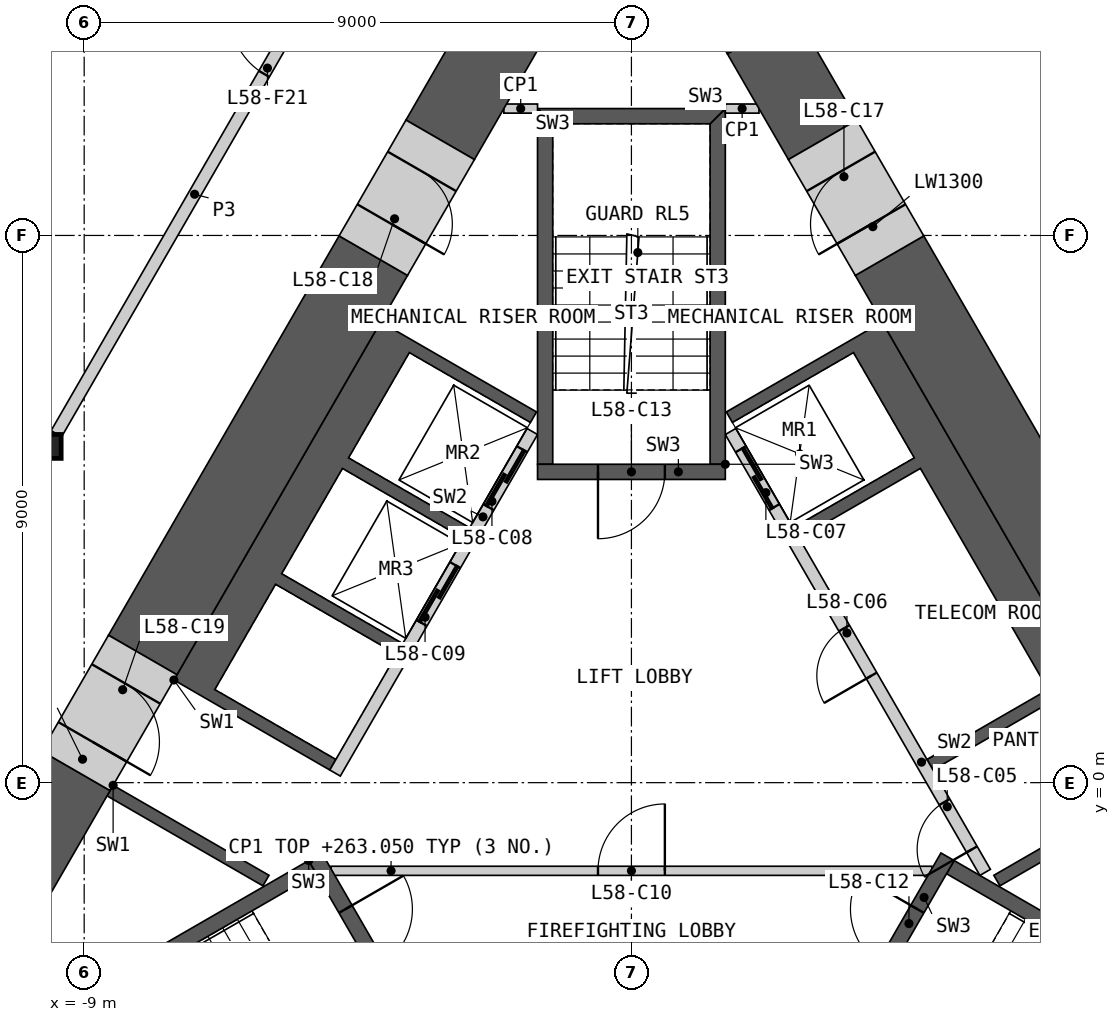
"""IFC4 building model, lengths in metres.
Left out: names, types, materials, properties, quantities, classifications, styles, units other than length and angle.
Written with IfcOpenShell. Run it as: python <this file> out.ifc"""

import sys

from ifc_helpers import new_model, si_unit, direction, frame, frame_2d, origin, origin_2d, place, context, subcontext, project, spatial, polyline, rectangle, i_section, outline, extrude, element, fill, save


model = new_model("IFC4")
c1 = context("Model", 3, precision=1e-05, world=origin(), true_north=direction((0.0, 1.0)))
c2 = subcontext(c1, "Body", "Model", "MODEL_VIEW")
j1 = project(units=[si_unit("LENGTHUNIT", "METRE"), si_unit("PLANEANGLEUNIT", "RADIAN")], contexts=[c1])
p1 = place(None, origin())
s1 = spatial("IfcSite", under=j1, at=p1, CompositionType="ELEMENT")
p2 = place(p1, origin())
s2 = spatial("IfcBuilding", under=s1, at=p2, CompositionType="ELEMENT")
p3 = place(p2, frame((0.0, 0.0, 259.8)))
s3 = spatial("IfcBuildingStorey", under=s2, at=p3, CompositionType="ELEMENT", Elevation=259.8)
p4 = place(p3, frame((-9.578, 5.53, 0.0), z_axis=(0.0, 0.0, 1.0), x_axis=(1.0, 0.0, 0.0)))
e1 = element("IfcColumn", 1, at=p4, inside=s3, PredefinedType="COLUMN", context=c2, shape_type="SweptSolid", body=[
    extrude(i_section(OverallWidth=0.399, OverallDepth=0.393, WebThickness=0.023, FlangeThickness=0.037, at=origin_2d()), origin(), (0.0, 0.0, 1.0), 3.6),
])
p5 = place(p3, origin())
e2 = element("IfcWall", 2, at=p5, inside=s3, PredefinedType="SHEAR", context=c2, shape_type="SweptSolid", body=[
    extrude(outline(polyline([(8.524, -0.044), (8.624, -0.217), (8.231, -0.444), (6.061, -1.697), (5.96, -1.524), (8.131, -0.271), (8.524, -0.044)])), origin(), (0.0, 0.0, 1.0), 3.25),
])
p6 = place(p3, origin())
e3 = element("IfcWall", 3, at=p6, inside=s3, PredefinedType="SHEAR", context=c2, shape_type="SweptSolid", body=[
    extrude(outline(polyline([(7.524, 1.688), (7.131, 1.461), (4.96, 0.208), (4.861, 0.381), (6.852, 1.531), (4.752, 5.169), (2.76, 4.019), (2.66, 4.192), (4.652, 5.342), (3.652, 7.074), (1.66, 5.924), (1.561, 6.097), (3.731, 7.35), (4.124, 7.577), (7.524, 1.688)])), origin(), (0.0, 0.0, 1.0), 3.25),
])
p7 = place(p3, frame((5.817, -1.476, 0.0), z_axis=(0.0, 0.0, 1.0), x_axis=(-0.500002616675, 0.866023893041, 0.0)))
e4 = element("IfcWall", 4, at=p7, inside=s3, PredefinedType="SOLIDWALL", context=c2, shape_type="SweptSolid", body=[
    extrude(rectangle(XDim=8.373, YDim=0.2, at=frame_2d((4.187, 0.0))), origin(), (0.0, 0.0, 1.0), 3.25),
])
p8 = place(p7, frame((0.437, 0.0, 0.0)))
e5 = element("IfcOpeningElement", 5, at=p8, cuts=e4, PredefinedType="OPENING", context=c2, shape_type="SweptSolid", body=[
    extrude(rectangle(XDim=0.9, YDim=2.1, at=frame_2d((0.45, 1.05))), frame((0.0, 0.11, 0.0), z_axis=(0.0, -1.0, 0.0), x_axis=(1.0, 0.0, 0.0)), (0.0, 0.0, 1.0), 0.22),
])
p9 = place(p7, frame((3.737, 0.0, 0.0)))
e6 = element("IfcOpeningElement", 6, at=p9, cuts=e4, PredefinedType="OPENING", context=c2, shape_type="SweptSolid", body=[
    extrude(rectangle(XDim=0.9, YDim=2.1, at=frame_2d((0.45, 1.05))), frame((0.0, 0.11, 0.0), z_axis=(0.0, -1.0, 0.0), x_axis=(1.0, 0.0, 0.0)), (0.0, 0.0, 1.0), 0.22),
])
p10 = place(p7, frame((6.937, 0.0, 0.0)))
e7 = element("IfcOpeningElement", 7, at=p10, cuts=e4, PredefinedType="OPENING", context=c2, shape_type="SweptSolid", body=[
    extrude(rectangle(XDim=1.1, YDim=2.1, at=frame_2d((0.55, 1.05))), frame((0.0, 0.11, 0.0), z_axis=(0.0, -1.0, 0.0), x_axis=(1.0, 0.0, 0.0)), (0.0, 0.0, 1.0), 0.22),
])
p11 = place(p3, origin())
e8 = element("IfcWall", 8, at=p11, inside=s3, PredefinedType="SHEAR", context=c2, shape_type="SweptSolid", body=[
    extrude(outline(polyline([(-7.524, 1.688), (-4.124, 7.577), (-3.731, 7.35), (-1.561, 6.097), (-1.66, 5.924), (-3.652, 7.074), (-4.652, 5.342), (-2.66, 4.192), (-2.76, 4.019), (-4.752, 5.169), (-5.752, 3.437), (-3.76, 2.287), (-3.861, 2.113), (-5.852, 3.263), (-6.852, 1.531), (-4.861, 0.381), (-4.96, 0.208), (-7.131, 1.461), (-7.524, 1.688)])), origin(), (0.0, 0.0, 1.0), 3.25),
])
p12 = place(p3, origin())
e9 = element("IfcWall", 9, at=p12, inside=s3, PredefinedType="SHEAR", context=c2, shape_type="SweptSolid", body=[
    extrude(outline(polyline([(-8.524, -0.044), (-8.131, -0.271), (-5.96, -1.524), (-6.061, -1.697), (-8.231, -0.444), (-8.624, -0.217), (-8.524, -0.044)])), origin(), (0.0, 0.0, 1.0), 3.25),
])
p13 = place(p3, frame((-1.631, 5.776, 0.0), z_axis=(0.0, 0.0, 1.0), x_axis=(-0.499992876559, -0.866029516466, 0.0)))
e10 = element("IfcWall", 10, at=p13, inside=s3, PredefinedType="SOLIDWALL", context=c2, shape_type="SweptSolid", body=[
    extrude(rectangle(XDim=6.486, YDim=0.2, at=frame_2d((3.243, 0.0))), origin(), (0.0, 0.0, 1.0), 3.25),
])
p14 = place(p13, frame((0.337, 0.0, 0.0)))
e11 = element("IfcOpeningElement", 11, at=p14, cuts=e10, PredefinedType="OPENING", context=c2, shape_type="SweptSolid", body=[
    extrude(rectangle(XDim=1.1, YDim=2.1, at=frame_2d((0.55, 1.05))), frame((0.0, 0.11, 0.0), z_axis=(0.0, -1.0, 0.0), x_axis=(1.0, 0.0, 0.0)), (0.0, 0.0, 1.0), 0.22),
])
p15 = place(p13, frame((2.537, 0.0, 0.0)))
e12 = element("IfcOpeningElement", 12, at=p15, cuts=e10, PredefinedType="OPENING", context=c2, shape_type="SweptSolid", body=[
    extrude(rectangle(XDim=1.1, YDim=2.1, at=frame_2d((0.55, 1.05))), frame((0.0, 0.11, 0.0), z_axis=(0.0, -1.0, 0.0), x_axis=(1.0, 0.0, 0.0)), (0.0, 0.0, 1.0), 0.22),
])
p16 = place(p3, frame((-4.941, -1.45, 0.0), z_axis=(0.0, 0.0, 1.0), x_axis=(1.0, 0.0, 0.0)))
e13 = element("IfcWall", 13, at=p16, inside=s3, PredefinedType="PARTITIONING", context=c2, shape_type="SweptSolid", body=[
    extrude(rectangle(XDim=9.882, YDim=0.15, at=frame_2d((4.941, 0.0))), origin(), (0.0, 0.0, 1.0), 3.25),
])
p17 = place(p16, frame((4.391, 0.0, 0.0)))
e14 = element("IfcOpeningElement", 14, at=p17, cuts=e13, PredefinedType="OPENING", context=c2, shape_type="SweptSolid", body=[
    extrude(rectangle(XDim=1.1, YDim=2.1, at=frame_2d((0.55, 1.05))), frame((0.0, 0.085, 0.0), z_axis=(0.0, -1.0, 0.0), x_axis=(1.0, 0.0, 0.0)), (0.0, 0.0, 1.0), 0.17),
])
p18 = place(p3, origin())
e15 = element("IfcWall", 15, at=p18, inside=s3, PredefinedType="SHEAR", context=c2, shape_type="SweptSolid", body=[
    extrude(outline(polyline([(-5.307, -1.281), (-10.374, -4.206), (-10.032, -4.298), (-5.182, -1.498), (-5.307, -1.281)])), origin(), (0.0, 0.0, 1.0), 3.25),
])
p19 = place(p3, frame((-5.199, -1.219, 0.0), z_axis=(0.0, 0.0, 1.0), x_axis=(0.499982516597, -0.866035497597, 0.0)))
e16 = element("IfcWall", 16, at=p19, inside=s3, PredefinedType="SHEAR", context=c2, shape_type="SweptSolid", body=[
    extrude(rectangle(XDim=3.088, YDim=0.25, at=frame_2d((1.544, 0.0))), origin(), (0.0, 0.0, 1.0), 3.25),
])
p20 = place(p19, frame((0.994, 0.0, 0.0)))
e17 = element("IfcOpeningElement", 17, at=p20, cuts=e16, PredefinedType="OPENING", context=c2, shape_type="SweptSolid", body=[
    extrude(rectangle(XDim=1.1, YDim=2.1, at=frame_2d((0.55, 1.05))), frame((0.0, 0.135, 0.0), z_axis=(0.0, -1.0, 0.0), x_axis=(1.0, 0.0, 0.0)), (0.0, 0.0, 1.0), 0.27),
])
p21 = place(p3, origin())
e18 = element("IfcWall", 18, at=p21, inside=s3, PredefinedType="SHEAR", context=c2, shape_type="SweptSolid", body=[
    extrude(outline(polyline([(10.032, -4.298), (10.374, -4.206), (5.307, -1.281), (5.182, -1.498), (10.032, -4.298)])), origin(), (0.0, 0.0, 1.0), 3.25),
])
p22 = place(p3, frame((3.655, -3.893, 0.0), z_axis=(0.0, 0.0, 1.0), x_axis=(0.499982516597, 0.866035497597, 0.0)))
e19 = element("IfcWall", 19, at=p22, inside=s3, PredefinedType="SHEAR", context=c2, shape_type="SweptSolid", body=[
    extrude(rectangle(XDim=3.088, YDim=0.25, at=frame_2d((1.544, 0.0))), origin(), (0.0, 0.0, 1.0), 3.25),
])
p23 = place(p22, frame((0.994, 0.0, 0.0)))
e20 = element("IfcOpeningElement", 20, at=p23, cuts=e19, PredefinedType="OPENING", context=c2, shape_type="SweptSolid", body=[
    extrude(rectangle(XDim=1.1, YDim=2.1, at=frame_2d((0.55, 1.05))), frame((0.0, 0.135, 0.0), z_axis=(0.0, -1.0, 0.0), x_axis=(1.0, 0.0, 0.0)), (0.0, 0.0, 1.0), 0.27),
])
p24 = place(p3, origin())
e21 = element("IfcWall", 21, at=p24, inside=s3, PredefinedType="SHEAR", context=c2, shape_type="SweptSolid", body=[
    extrude(outline(polyline([(1.544, 5.237), (1.544, 11.087), (1.294, 10.837), (1.294, 5.237), (1.544, 5.237)])), origin(), (0.0, 0.0, 1.0), 3.25),
])
p25 = place(p3, origin())
e22 = element("IfcWall", 22, at=p25, inside=s3, PredefinedType="SHEAR", context=c2, shape_type="SweptSolid", body=[
    extrude(outline(polyline([(1.544, 11.087), (-1.544, 11.087), (-1.294, 10.837), (1.294, 10.837), (1.544, 11.087)])), origin(), (0.0, 0.0, 1.0), 3.25),
])
p26 = place(p3, origin())
e23 = element("IfcWall", 23, at=p26, inside=s3, PredefinedType="SHEAR", context=c2, shape_type="SweptSolid", body=[
    extrude(outline(polyline([(-1.294, 10.837), (-1.544, 11.087), (-1.544, 5.237), (-1.294, 5.237), (-1.294, 10.837)])), origin(), (0.0, 0.0, 1.0), 3.25),
])
p27 = place(p3, frame((1.544, 5.112, 0.0), z_axis=(0.0, 0.0, 1.0), x_axis=(-1.0, 0.0, 0.0)))
e24 = element("IfcWall", 24, at=p27, inside=s3, PredefinedType="SHEAR", context=c2, shape_type="SweptSolid", body=[
    extrude(rectangle(XDim=3.088, YDim=0.25, at=frame_2d((1.544, 0.0))), origin(), (0.0, 0.0, 1.0), 3.25),
])
p28 = place(p27, frame((0.994, 0.0, 0.0)))
e25 = element("IfcOpeningElement", 25, at=p28, cuts=e24, PredefinedType="OPENING", context=c2, shape_type="SweptSolid", body=[
    extrude(rectangle(XDim=1.1, YDim=2.1, at=frame_2d((0.55, 1.05))), frame((0.0, 0.135, 0.0), z_axis=(0.0, -1.0, 0.0), x_axis=(1.0, 0.0, 0.0)), (0.0, 0.0, 1.0), 0.27),
])
for number, where, z_axis, x_axis in (
    (26, (1.544, 11.087, 0.0), (0.0, 0.0, 1.0), (1.0, 0.0, 0.0)),
    (27, (-1.544, 11.087, 0.0), (0.0, 0.0, 1.0), (-1.0, 0.0, 0.0)),
):
    element("IfcWall", number, at=place(p3, frame(where, z_axis=z_axis, x_axis=x_axis)), inside=s3, PredefinedType="PARTITIONING", context=c2, shape_type="SweptSolid", body=[
        extrude(rectangle(XDim=0.554, YDim=0.15, at=frame_2d((0.277, 0.0))), origin(), (0.0, 0.0, 1.0), 3.25),
    ])
p29 = place(p3, frame((10.081, -1.441, 0.0), z_axis=(0.0, 0.0, 1.0), x_axis=(-0.500006109471, 0.866021876451, 0.0)))
e28 = element("IfcWall", 28, at=p29, inside=s3, PredefinedType="SHEAR", context=c2, shape_type="SweptSolid", body=[
    extrude(rectangle(XDim=11.672, YDim=1.3, at=frame_2d((5.836, 0.0))), origin(), (0.0, 0.0, 1.0), 3.25),
])
p30 = place(p3, frame((3.145, 10.573, 0.0), z_axis=(0.0, 0.0, 1.0), x_axis=(-0.500006371327, 0.866021725266, 0.0)))
e29 = element("IfcWall", 29, at=p30, inside=s3, PredefinedType="SHEAR", context=c2, shape_type="SweptSolid", body=[
    extrude(rectangle(XDim=2.01, YDim=1.3, at=frame_2d((1.005, 0.0))), origin(), (0.0, 0.0, 1.0), 3.25),
])
p31 = place(p3, frame((-4.245, 8.668, 0.0), z_axis=(0.0, 0.0, 1.0), x_axis=(-0.500002971097, -0.866023688414, 0.0)))
e30 = element("IfcWall", 30, at=p31, inside=s3, PredefinedType="SHEAR", context=c2, shape_type="SweptSolid", body=[
    extrude(rectangle(XDim=7.584, YDim=1.3, at=frame_2d((3.792, 0.0))), origin(), (0.0, 0.0, 1.0), 3.25),
])
p32 = place(p3, frame((-0.563, 15.045, 0.0), z_axis=(0.0, 0.0, 1.0), x_axis=(-0.499982995661, -0.866035221021, 0.0)))
e31 = element("IfcWall", 31, at=p32, inside=s3, PredefinedType="SHEAR", context=c2, shape_type="SweptSolid", body=[
    extrude(rectangle(XDim=5.164, YDim=1.3, at=frame_2d((2.582, 0.0))), origin(), (0.0, 0.0, 1.0), 3.25),
])
p33 = place(p3, frame((-9.137, 0.195, 0.0), z_axis=(0.0, 0.0, 1.0), x_axis=(-0.499985697398, -0.866033661238, 0.0)))
e32 = element("IfcWall", 32, at=p33, inside=s3, PredefinedType="SHEAR", context=c2, shape_type="SweptSolid", body=[
    extrude(rectangle(XDim=4.362, YDim=1.3, at=frame_2d((2.181, 0.0))), origin(), (0.0, 0.0, 1.0), 3.25),
])
p34 = place(p3, frame((2.14, 12.313, 0.0), z_axis=(0.0, 0.0, 1.0), x_axis=(-0.499968102766, 0.866043818878, 0.0)))
e33 = element("IfcWall", 33, at=p34, inside=s3, PredefinedType="SHEAR", context=c2, shape_type="SweptSolid", body=[
    extrude(rectangle(XDim=3.155, YDim=1.3, at=frame_2d((1.577, 0.0))), origin(), (0.0, 0.0, 1.0), 3.25),
])
p35 = place(p34, frame((0.6, 0.0, 0.0)))
e34 = element("IfcOpeningElement", 34, at=p35, cuts=e33, PredefinedType="OPENING", context=c2, shape_type="SweptSolid", body=[
    extrude(rectangle(XDim=1.0, YDim=2.1, at=frame_2d((0.5, 1.05))), frame((0.0, 0.66, 0.0), z_axis=(0.0, -1.0, 0.0), x_axis=(1.0, 0.0, 0.0)), (0.0, 0.0, 1.0), 1.32),
])
p36 = place(p3, frame((4.245, 8.668, 0.0), z_axis=(0.0, 0.0, 1.0), x_axis=(-0.50002983664, 0.866008176907, 0.0)))
e35 = element("IfcWall", 35, at=p36, inside=s3, PredefinedType="SHEAR", context=c2, shape_type="SweptSolid", body=[
    extrude(rectangle(XDim=2.2, YDim=1.3, at=frame_2d((1.1, 0.0))), origin(), (0.0, 0.0, 1.0), 3.25),
])
p37 = place(p36, frame((0.6, 0.0, 0.0)))
e36 = element("IfcOpeningElement", 36, at=p37, cuts=e35, PredefinedType="OPENING", context=c2, shape_type="SweptSolid", body=[
    extrude(rectangle(XDim=1.0, YDim=2.1, at=frame_2d((0.5, 1.05))), frame((0.0, 0.66, 0.0), z_axis=(0.0, -1.0, 0.0), x_axis=(1.0, 0.0, 0.0)), (0.0, 0.0, 1.0), 1.32),
])
p38 = place(p3, frame((-3.145, 10.573, 0.0), z_axis=(0.0, 0.0, 1.0), x_axis=(-0.50002983664, -0.866008176907, 0.0)))
e37 = element("IfcWall", 37, at=p38, inside=s3, PredefinedType="SHEAR", context=c2, shape_type="SweptSolid", body=[
    extrude(rectangle(XDim=2.2, YDim=1.3, at=frame_2d((1.1, 0.0))), origin(), (0.0, 0.0, 1.0), 3.25),
])
p39 = place(p38, frame((0.6, 0.0, 0.0)))
e38 = element("IfcOpeningElement", 38, at=p39, cuts=e37, PredefinedType="OPENING", context=c2, shape_type="SweptSolid", body=[
    extrude(rectangle(XDim=1.0, YDim=2.1, at=frame_2d((0.5, 1.05))), frame((0.0, 0.66, 0.0), z_axis=(0.0, -1.0, 0.0), x_axis=(1.0, 0.0, 0.0)), (0.0, 0.0, 1.0), 1.32),
])
p40 = place(p3, frame((-8.037, 2.1, 0.0), z_axis=(0.0, 0.0, 1.0), x_axis=(-0.50002983664, -0.866008176907, 0.0)))
e39 = element("IfcWall", 39, at=p40, inside=s3, PredefinedType="SHEAR", context=c2, shape_type="SweptSolid", body=[
    extrude(rectangle(XDim=2.2, YDim=1.3, at=frame_2d((1.1, 0.0))), origin(), (0.0, 0.0, 1.0), 3.25),
])
p41 = place(p40, frame((0.55, 0.0, 0.0)))
e40 = element("IfcOpeningElement", 40, at=p41, cuts=e39, PredefinedType="OPENING", context=c2, shape_type="SweptSolid", body=[
    extrude(rectangle(XDim=1.1, YDim=2.1, at=frame_2d((0.55, 1.05))), frame((0.0, 0.66, 0.0), z_axis=(0.0, -1.0, 0.0), x_axis=(1.0, 0.0, 0.0)), (0.0, 0.0, 1.0), 1.32),
])
p42 = place(p3, frame((5.377, 18.807, 0.0), z_axis=(0.0, 0.0, 1.0), x_axis=(0.499999852422, -0.866025488988, 0.0)))
e41 = element("IfcWall", 41, at=p42, inside=s3, PredefinedType="PARTITIONING", context=c2, shape_type="SweptSolid", body=[
    extrude(rectangle(XDim=27.198, YDim=0.2, at=frame_2d((13.599, 0.0))), origin(), (0.0, 0.0, 1.0), 3.25),
])
p43 = place(p42, frame((25.096, 0.0, 0.0)))
e42 = element("IfcOpeningElement", 42, at=p43, cuts=e41, PredefinedType="OPENING", context=c2, shape_type="SweptSolid", body=[
    extrude(rectangle(XDim=0.95, YDim=2.1, at=frame_2d((0.475, 1.05))), frame((0.0, 0.11, 0.0), z_axis=(0.0, -1.0, 0.0), x_axis=(1.0, 0.0, 0.0)), (0.0, 0.0, 1.0), 0.22),
])
p44 = place(p42, frame((19.122, 0.0, 0.0)))
e43 = element("IfcOpeningElement", 43, at=p44, cuts=e41, PredefinedType="OPENING", context=c2, shape_type="SweptSolid", body=[
    extrude(rectangle(XDim=1.0, YDim=2.1, at=frame_2d((0.5, 1.05))), frame((0.0, 0.11, 0.0), z_axis=(0.0, -1.0, 0.0), x_axis=(1.0, 0.0, 0.0)), (0.0, 0.0, 1.0), 0.22),
])
p45 = place(p42, frame((17.115, 0.0, 0.0)))
e44 = element("IfcOpeningElement", 44, at=p45, cuts=e41, PredefinedType="OPENING", context=c2, shape_type="SweptSolid", body=[
    extrude(rectangle(XDim=1.1, YDim=2.1, at=frame_2d((0.55, 1.05))), frame((0.0, 0.11, 0.0), z_axis=(0.0, -1.0, 0.0), x_axis=(1.0, 0.0, 0.0)), (0.0, 0.0, 1.0), 0.22),
])
p46 = place(p42, frame((0.35, 0.0, 0.0)))
e45 = element("IfcOpeningElement", 45, at=p46, cuts=e41, PredefinedType="OPENING", context=c2, shape_type="SweptSolid", body=[
    extrude(rectangle(XDim=1.1, YDim=2.1, at=frame_2d((0.55, 1.05))), frame((0.0, 0.11, 0.0), z_axis=(0.0, -1.0, 0.0), x_axis=(1.0, 0.0, 0.0)), (0.0, 0.0, 1.0), 0.22),
])
p47 = place(p3, frame((-9.458, 5.74, 0.0), z_axis=(0.0, 0.0, 1.0), x_axis=(0.50000207303, 0.866024206917, 0.0)))
e46 = element("IfcWall", 46, at=p47, inside=s3, PredefinedType="PARTITIONING", context=c2, shape_type="SweptSolid", body=[
    extrude(rectangle(XDim=9.095, YDim=0.2, at=frame_2d((4.547, 0.0))), origin(), (0.0, 0.0, 1.0), 3.25),
])
p48 = place(p47, frame((6.833, 0.0, 0.0)))
e47 = element("IfcOpeningElement", 47, at=p48, cuts=e46, PredefinedType="OPENING", context=c2, shape_type="SweptSolid", body=[
    extrude(rectangle(XDim=1.1, YDim=2.1, at=frame_2d((0.55, 1.05))), frame((0.0, 0.11, 0.0), z_axis=(0.0, -1.0, 0.0), x_axis=(1.0, 0.0, 0.0)), (0.0, 0.0, 1.0), 0.22),
])
p49 = place(p8, origin())
e48 = element("IfcDoor", 48, at=p49, inside=s3, OperationType="SINGLE_SWING_LEFT", PredefinedType="DOOR", context=c2, shape_type="SweptSolid", body=[
    extrude(rectangle(XDim=0.9, YDim=2.1, at=frame_2d((0.45, 1.05))), frame((0.0, 0.025, 0.0), z_axis=(0.0, -1.0, 0.0), x_axis=(1.0, 0.0, 0.0)), (0.0, 0.0, 1.0), 0.05),
])
fill(e5, e48)
p50 = place(p9, origin())
e49 = element("IfcDoor", 49, at=p50, inside=s3, OperationType="SINGLE_SWING_LEFT", PredefinedType="DOOR", context=c2, shape_type="SweptSolid", body=[
    extrude(rectangle(XDim=0.9, YDim=2.1, at=frame_2d((0.45, 1.05))), frame((0.0, 0.025, 0.0), z_axis=(0.0, -1.0, 0.0), x_axis=(1.0, 0.0, 0.0)), (0.0, 0.0, 1.0), 0.05),
])
fill(e6, e49)
p51 = place(p10, origin())
e50 = element("IfcDoor", 50, at=p51, inside=s3, OperationType="SLIDING_TO_LEFT", PredefinedType="DOOR", context=c2, shape_type="SweptSolid", body=[
    extrude(rectangle(XDim=1.1, YDim=2.1, at=frame_2d((0.55, 1.05))), frame((0.0, 0.025, 0.0), z_axis=(0.0, -1.0, 0.0), x_axis=(1.0, 0.0, 0.0)), (0.0, 0.0, 1.0), 0.05),
])
fill(e7, e50)
p52 = place(p14, origin())
e51 = element("IfcDoor", 51, at=p52, inside=s3, OperationType="SLIDING_TO_LEFT", PredefinedType="DOOR", context=c2, shape_type="SweptSolid", body=[
    extrude(rectangle(XDim=1.1, YDim=2.1, at=frame_2d((0.55, 1.05))), frame((0.0, 0.025, 0.0), z_axis=(0.0, -1.0, 0.0), x_axis=(1.0, 0.0, 0.0)), (0.0, 0.0, 1.0), 0.05),
])
fill(e11, e51)
p53 = place(p15, origin())
e52 = element("IfcDoor", 52, at=p53, inside=s3, OperationType="SLIDING_TO_LEFT", PredefinedType="DOOR", context=c2, shape_type="SweptSolid", body=[
    extrude(rectangle(XDim=1.1, YDim=2.1, at=frame_2d((0.55, 1.05))), frame((0.0, 0.025, 0.0), z_axis=(0.0, -1.0, 0.0), x_axis=(1.0, 0.0, 0.0)), (0.0, 0.0, 1.0), 0.05),
])
fill(e12, e52)
p54 = place(p17, origin())
e53 = element("IfcDoor", 53, at=p54, inside=s3, OperationType="SINGLE_SWING_RIGHT", PredefinedType="DOOR", context=c2, shape_type="SweptSolid", body=[
    extrude(rectangle(XDim=1.1, YDim=2.1, at=frame_2d((0.55, 1.05))), frame((0.0, 0.025, 0.0), z_axis=(0.0, -1.0, 0.0), x_axis=(1.0, 0.0, 0.0)), (0.0, 0.0, 1.0), 0.05),
])
fill(e14, e53)
p55 = place(p20, origin())
e54 = element("IfcDoor", 54, at=p55, inside=s3, OperationType="SINGLE_SWING_LEFT", PredefinedType="DOOR", context=c2, shape_type="SweptSolid", body=[
    extrude(rectangle(XDim=1.1, YDim=2.1, at=frame_2d((0.55, 1.05))), frame((0.0, 0.025, 0.0), z_axis=(0.0, -1.0, 0.0), x_axis=(1.0, 0.0, 0.0)), (0.0, 0.0, 1.0), 0.05),
])
fill(e17, e54)
p56 = place(p23, origin())
e55 = element("IfcDoor", 55, at=p56, inside=s3, OperationType="SINGLE_SWING_RIGHT", PredefinedType="DOOR", context=c2, shape_type="SweptSolid", body=[
    extrude(rectangle(XDim=1.1, YDim=2.1, at=frame_2d((0.55, 1.05))), frame((0.0, 0.025, 0.0), z_axis=(0.0, -1.0, 0.0), x_axis=(1.0, 0.0, 0.0)), (0.0, 0.0, 1.0), 0.05),
])
fill(e20, e55)
p57 = place(p28, origin())
e56 = element("IfcDoor", 56, at=p57, inside=s3, OperationType="SINGLE_SWING_RIGHT", PredefinedType="DOOR", context=c2, shape_type="SweptSolid", body=[
    extrude(rectangle(XDim=1.1, YDim=2.1, at=frame_2d((0.55, 1.05))), frame((0.0, 0.025, 0.0), z_axis=(0.0, -1.0, 0.0), x_axis=(1.0, 0.0, 0.0)), (0.0, 0.0, 1.0), 0.05),
])
fill(e25, e56)
p58 = place(p37, origin())
e57 = element("IfcDoor", 57, at=p58, inside=s3, OperationType="SINGLE_SWING_LEFT", PredefinedType="DOOR", context=c2, shape_type="SweptSolid", body=[
    extrude(rectangle(XDim=1.0, YDim=2.1, at=frame_2d((0.5, 1.05))), frame((0.0, 0.405, 0.0), z_axis=(0.0, -1.0, 0.0), x_axis=(1.0, 0.0, 0.0)), (0.0, 0.0, 1.0), 0.05),
])
fill(e36, e57)
p59 = place(p39, origin())
e58 = element("IfcDoor", 58, at=p59, inside=s3, OperationType="SINGLE_SWING_RIGHT", PredefinedType="DOOR", context=c2, shape_type="SweptSolid", body=[
    extrude(rectangle(XDim=1.0, YDim=2.1, at=frame_2d((0.5, 1.05))), frame((0.0, 0.405, 0.0), z_axis=(0.0, -1.0, 0.0), x_axis=(1.0, 0.0, 0.0)), (0.0, 0.0, 1.0), 0.05),
])
fill(e38, e58)
p60 = place(p41, origin())
e59 = element("IfcDoor", 59, at=p60, inside=s3, OperationType="SINGLE_SWING_RIGHT", PredefinedType="DOOR", context=c2, shape_type="SweptSolid", body=[
    extrude(rectangle(XDim=1.1, YDim=2.1, at=frame_2d((0.55, 1.05))), frame((0.0, 0.405, 0.0), z_axis=(0.0, -1.0, 0.0), x_axis=(1.0, 0.0, 0.0)), (0.0, 0.0, 1.0), 0.05),
])
fill(e40, e59)
p61 = place(p48, origin())
e60 = element("IfcDoor", 60, at=p61, inside=s3, OperationType="SINGLE_SWING_RIGHT", PredefinedType="DOOR", context=c2, shape_type="SweptSolid", body=[
    extrude(rectangle(XDim=1.1, YDim=2.1, at=frame_2d((0.55, 1.05))), frame((0.0, 0.025, 0.0), z_axis=(0.0, -1.0, 0.0), x_axis=(1.0, 0.0, 0.0)), (0.0, 0.0, 1.0), 0.05),
])
fill(e47, e60)
save(model, sys.argv[1])
